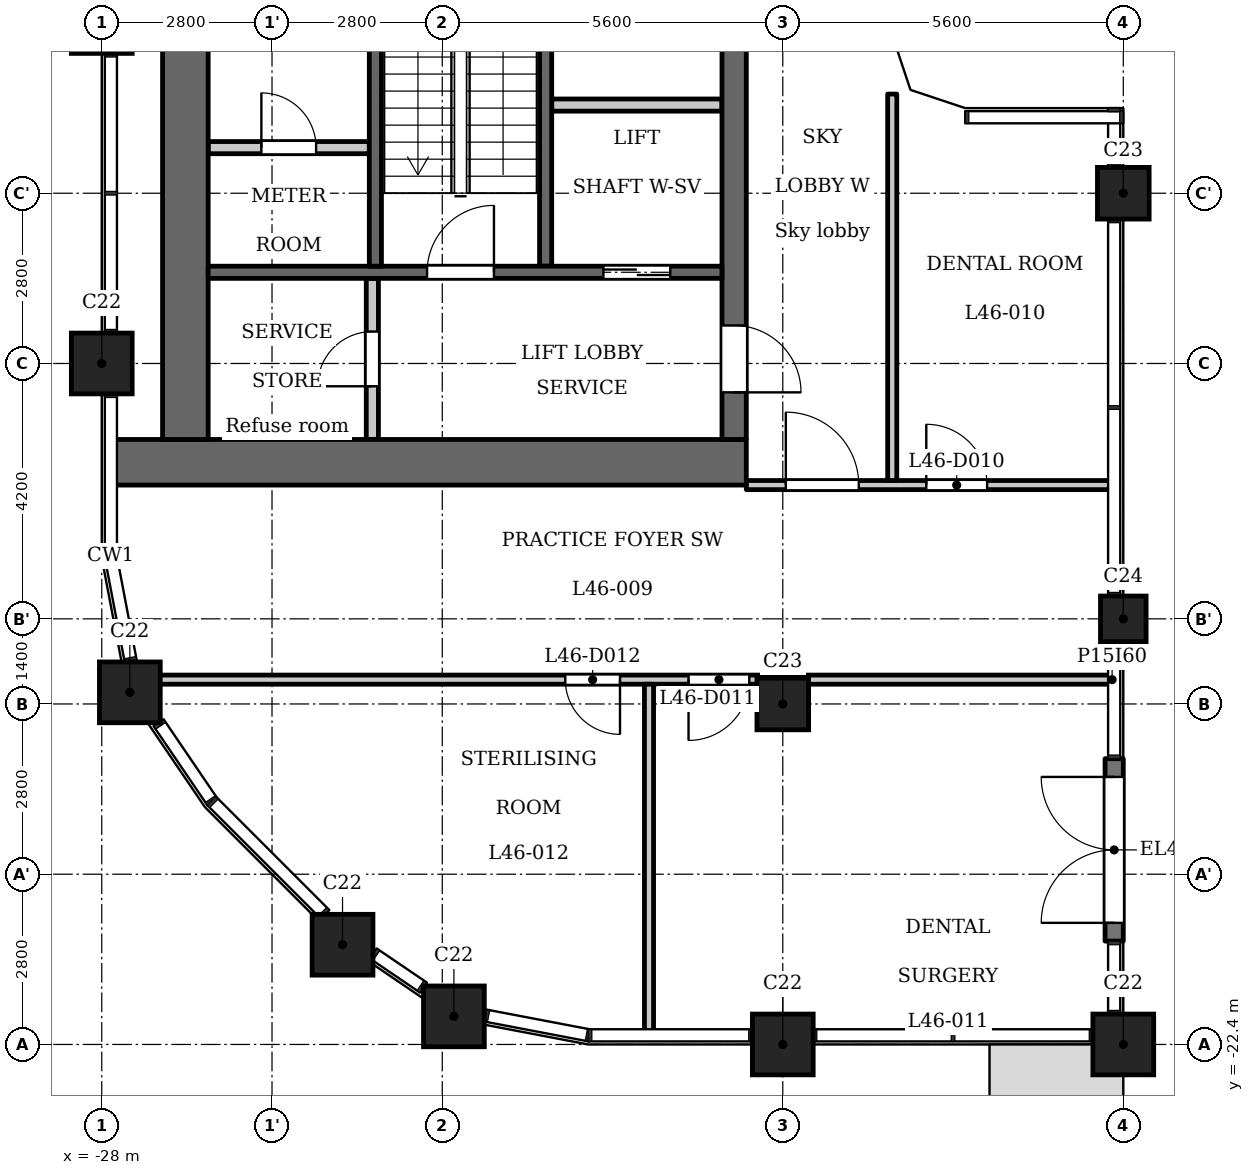
"""IFC4 building model, lengths in metres.
Left out: names, types, materials, properties, quantities, classifications, styles, units other than length and angle.
Written with IfcOpenShell. Run it as: python <this file> out.ifc"""

import sys

from ifc_helpers import new_model, si_unit, direction, frame, frame_2d, origin, origin_2d, place, context, subcontext, project, spatial, polyline, rectangle, outline, extrude, element, fill, save


model = new_model("IFC4")
c1 = context("Model", 3, precision=1e-05, world=origin(), true_north=direction((0.0, 1.0)))
c2 = subcontext(c1, "Body", "Model", "MODEL_VIEW")
j1 = project(units=[si_unit("LENGTHUNIT", "METRE"), si_unit("PLANEANGLEUNIT", "RADIAN")], contexts=[c1])
p1 = place(None, origin())
s1 = spatial("IfcSite", under=j1, at=p1, CompositionType="ELEMENT")
p2 = place(p1, origin())
s2 = spatial("IfcBuilding", under=s1, at=p2, CompositionType="ELEMENT")
p3 = place(p2, frame((0.0, 0.0, 178.1)))
s3 = spatial("IfcBuildingStorey", under=s2, at=p3, CompositionType="ELEMENT", Elevation=178.1)
for number, where, z_axis, x_axis in (
    (1, (-22.209, -21.938, 0.0), (0.0, 0.0, 1.0), (1.0, 0.0, 0.0)),
    (2, (-16.8, -22.4, 0.0), (0.0, 0.0, 1.0), (1.0, 0.0, 0.0)),
    (3, (-11.2, -22.4, 0.0), (0.0, 0.0, 1.0), (1.0, 0.0, 0.0)),
    (4, (-28.0, -5.6, 0.0), (0.0, 0.0, 1.0), (1.0, 0.0, 0.0)),
    (5, (-28.0, -11.2, 0.0), (0.0, 0.0, 1.0), (1.0, 0.0, 0.0)),
    (6, (-27.538, -16.609, 0.0), (0.0, 0.0, 1.0), (1.0, 0.0, 0.0)),
    (7, (-24.04, -20.76, 0.0), (0.0, 0.0, 1.0), (1.0, 0.0, 0.0)),
):
    element("IfcColumn", number, at=place(p3, frame(where, z_axis=z_axis, x_axis=x_axis)), inside=s3, PredefinedType="COLUMN", context=c2, shape_type="SweptSolid", body=[
        extrude(rectangle(XDim=1.0, YDim=1.0, at=origin_2d()), origin(), (0.0, 0.0, 1.0), 5.4),
    ])
for number, where, z_axis, x_axis in (
    (8, (-16.8, -16.8, 0.0), (0.0, 0.0, 1.0), (1.0, 0.0, 0.0)),
    (9, (-11.2, -8.4, 0.0), (0.0, 0.0, 1.0), (1.0, 0.0, 0.0)),
):
    element("IfcColumn", number, at=place(p3, frame(where, z_axis=z_axis, x_axis=x_axis)), inside=s3, PredefinedType="COLUMN", context=c2, shape_type="SweptSolid", body=[
        extrude(rectangle(XDim=0.85, YDim=0.85, at=origin_2d()), origin(), (0.0, 0.0, 1.0), 5.4),
    ])
p4 = place(p3, frame((-11.2, -15.4, 0.0), z_axis=(0.0, 0.0, 1.0), x_axis=(1.0, 0.0, 0.0)))
e10 = element("IfcColumn", 10, at=p4, inside=s3, PredefinedType="COLUMN", context=c2, shape_type="SweptSolid", body=[
    extrude(rectangle(XDim=0.75, YDim=0.75, at=origin_2d()), origin(), (0.0, 0.0, 1.0), 5.4),
])
p5 = place(p3, frame((-11.35, -20.7, 0.0), z_axis=(0.0, 0.0, 1.0), x_axis=(0.0, 1.0, 0.0)))
e11 = element("IfcWall", 11, at=p5, inside=s3, PredefinedType="SOLIDWALL", context=c2, shape_type="SweptSolid", body=[
    extrude(rectangle(XDim=3.0, YDim=0.3, at=frame_2d((1.5, 0.0))), origin(), (0.0, 0.0, 1.0), 4.95),
])
p6 = place(p5, frame((0.3, 0.0, 0.0)))
e12 = element("IfcOpeningElement", 12, at=p6, cuts=e11, PredefinedType="OPENING", context=c2, shape_type="SweptSolid", body=[
    extrude(rectangle(XDim=2.4, YDim=2.3, at=frame_2d((1.2, 1.15))), frame((0.0, 0.16, 0.0), z_axis=(0.0, -1.0, 0.0), x_axis=(1.0, 0.0, 0.0)), (0.0, 0.0, 1.0), 0.32),
])
p7 = place(p3, frame((-20.7, -9.6, 0.0), z_axis=(0.0, 0.0, 1.0), x_axis=(0.0, 1.0, 0.0)))
e13 = element("IfcWall", 13, at=p7, inside=s3, PredefinedType="SHEAR", context=c2, shape_type="SweptSolid", body=[
    extrude(rectangle(XDim=9.75, YDim=0.2, at=frame_2d((4.875, 0.0))), origin(), (0.0, 0.0, 1.0), 4.95),
])
p8 = place(p3, frame((-17.4, -12.825, 0.0), z_axis=(0.0, 0.0, 1.0), x_axis=(-1.0, 0.0, 0.0)))
e14 = element("IfcWall", 14, at=p8, inside=s3, PredefinedType="SHEAR", context=c2, shape_type="SweptSolid", body=[
    extrude(rectangle(XDim=10.4, YDim=0.75, at=frame_2d((5.2, 0.0))), origin(), (0.0, 0.0, 1.0), 4.95),
])
p9 = place(p3, frame((-17.6, -12.45, 0.0), z_axis=(0.0, 0.0, 1.0), x_axis=(0.0, 1.0, 0.0)))
e15 = element("IfcWall", 15, at=p9, inside=s3, PredefinedType="SHEAR", context=c2, shape_type="SweptSolid", body=[
    extrude(rectangle(XDim=24.9, YDim=0.4, at=frame_2d((12.45, 0.0))), origin(), (0.0, 0.0, 1.0), 4.95),
])
p10 = place(p9, frame((6.85, 0.0, 0.0)))
e16 = element("IfcOpeningElement", 16, at=p10, cuts=e15, PredefinedType="OPENING", context=c2, shape_type="SweptSolid", body=[
    extrude(rectangle(XDim=0.9, YDim=2.1, at=frame_2d((0.45, 1.05))), frame((0.0, 0.21, 0.0), z_axis=(0.0, -1.0, 0.0), x_axis=(1.0, 0.0, 0.0)), (0.0, 0.0, 1.0), 0.42),
])
p11 = place(p9, frame((10.45, 0.0, 0.0)))
e17 = element("IfcOpeningElement", 17, at=p11, cuts=e15, PredefinedType="OPENING", context=c2, shape_type="SweptSolid", body=[
    extrude(rectangle(XDim=0.9, YDim=2.1, at=frame_2d((0.45, 1.05))), frame((0.0, 0.21, 0.0), z_axis=(0.0, -1.0, 0.0), x_axis=(1.0, 0.0, 0.0)), (0.0, 0.0, 1.0), 0.42),
])
p12 = place(p9, frame((15.6, 0.0, 0.0)))
e18 = element("IfcOpeningElement", 18, at=p12, cuts=e15, PredefinedType="OPENING", context=c2, shape_type="SweptSolid", body=[
    extrude(rectangle(XDim=1.1, YDim=2.1, at=frame_2d((0.55, 1.05))), frame((0.0, 0.21, 0.0), z_axis=(0.0, -1.0, 0.0), x_axis=(1.0, 0.0, 0.0)), (0.0, 0.0, 1.0), 0.42),
])
p13 = place(p9, frame((18.0, 0.0, 0.0)))
e19 = element("IfcOpeningElement", 19, at=p13, cuts=e15, PredefinedType="OPENING", context=c2, shape_type="SweptSolid", body=[
    extrude(rectangle(XDim=1.1, YDim=2.1, at=frame_2d((0.55, 1.05))), frame((0.0, 0.21, 0.0), z_axis=(0.0, -1.0, 0.0), x_axis=(1.0, 0.0, 0.0)), (0.0, 0.0, 1.0), 0.42),
])
p14 = place(p9, frame((23.025, 0.0, 0.0)))
e20 = element("IfcOpeningElement", 20, at=p14, cuts=e15, PredefinedType="OPENING", context=c2, shape_type="SweptSolid", body=[
    extrude(rectangle(XDim=1.1, YDim=2.1, at=frame_2d((0.55, 1.05))), frame((0.0, 0.21, 0.0), z_axis=(0.0, -1.0, 0.0), x_axis=(1.0, 0.0, 0.0)), (0.0, 0.0, 1.0), 0.42),
])
p15 = place(p9, frame((0.775, 0.0, 0.0)))
e21 = element("IfcOpeningElement", 21, at=p15, cuts=e15, PredefinedType="OPENING", context=c2, shape_type="SweptSolid", body=[
    extrude(rectangle(XDim=1.1, YDim=2.1, at=frame_2d((0.55, 1.05))), frame((0.0, 0.21, 0.0), z_axis=(0.0, -1.0, 0.0), x_axis=(1.0, 0.0, 0.0)), (0.0, 0.0, 1.0), 0.42),
])
p16 = place(p9, frame((12.925, 0.0, 0.0)))
e22 = element("IfcOpeningElement", 22, at=p16, cuts=e15, PredefinedType="OPENING", context=c2, shape_type="SweptSolid", body=[
    extrude(rectangle(XDim=1.8, YDim=2.1, at=frame_2d((0.9, 1.05))), frame((0.0, 0.21, 0.0), z_axis=(0.0, -1.0, 0.0), x_axis=(1.0, 0.0, 0.0)), (0.0, 0.0, 1.0), 0.42),
])
p17 = place(p3, frame((-26.625, -12.45, 0.0), z_axis=(0.0, 0.0, 1.0), x_axis=(0.0, 1.0, 0.0)))
e23 = element("IfcWall", 23, at=p17, inside=s3, PredefinedType="SHEAR", context=c2, shape_type="SweptSolid", body=[
    extrude(rectangle(XDim=24.9, YDim=0.75, at=frame_2d((12.45, 0.0))), origin(), (0.0, 0.0, 1.0), 4.95),
])
p18 = place(p3, frame((-23.55, -12.45, 0.0), z_axis=(0.0, 0.0, 1.0), x_axis=(0.0, 1.0, 0.0)))
e24 = element("IfcWall", 24, at=p18, inside=s3, PredefinedType="PARTITIONING", context=c2, shape_type="SweptSolid", body=[
    extrude(rectangle(XDim=2.65, YDim=0.2, at=frame_2d((1.325, 0.0))), origin(), (0.0, 0.0, 1.0), 4.95),
])
p19 = place(p18, frame((0.875, 0.0, 0.0)))
e25 = element("IfcOpeningElement", 25, at=p19, cuts=e24, PredefinedType="OPENING", context=c2, shape_type="SweptSolid", body=[
    extrude(rectangle(XDim=0.9, YDim=2.1, at=frame_2d((0.45, 1.05))), frame((0.0, 0.11, 0.0), z_axis=(0.0, -1.0, 0.0), x_axis=(1.0, 0.0, 0.0)), (0.0, 0.0, 1.0), 0.22),
])
p20 = place(p3, frame((-23.6, -7.65, 0.0), z_axis=(0.0, 0.0, 1.0), x_axis=(-1.0, 0.0, 0.0)))
e26 = element("IfcWall", 26, at=p20, inside=s3, PredefinedType="PARTITIONING", context=c2, shape_type="SweptSolid", body=[
    extrude(rectangle(XDim=2.65, YDim=0.2, at=frame_2d((1.325, 0.0))), origin(), (0.0, 0.0, 1.0), 4.95),
])
p21 = place(p20, frame((0.875, 0.0, 0.0)))
e27 = element("IfcOpeningElement", 27, at=p21, cuts=e26, PredefinedType="OPENING", context=c2, shape_type="SweptSolid", body=[
    extrude(rectangle(XDim=0.9, YDim=2.1, at=frame_2d((0.45, 1.05))), frame((0.0, 0.11, 0.0), z_axis=(0.0, -1.0, 0.0), x_axis=(1.0, 0.0, 0.0)), (0.0, 0.0, 1.0), 0.22),
])
p22 = place(p3, frame((-17.8, -9.7, 0.0), z_axis=(0.0, 0.0, 1.0), x_axis=(-1.0, 0.0, 0.0)))
e28 = element("IfcWall", 28, at=p22, inside=s3, PredefinedType="SHEAR", context=c2, shape_type="SweptSolid", body=[
    extrude(rectangle(XDim=8.45, YDim=0.2, at=frame_2d((4.225, 0.0))), origin(), (0.0, 0.0, 1.0), 4.95),
])
p23 = place(p22, frame((0.85, 0.0, 0.0)))
e29 = element("IfcOpeningElement", 29, at=p23, cuts=e28, PredefinedType="OPENING", context=c2, shape_type="SweptSolid", body=[
    extrude(rectangle(XDim=1.1, YDim=2.1, at=frame_2d((0.55, 1.05))), frame((0.0, 0.11, 0.0), z_axis=(0.0, -1.0, 0.0), x_axis=(1.0, 0.0, 0.0)), (0.0, 0.0, 1.0), 0.22),
])
p24 = place(p22, frame((3.75, 0.0, 0.0)))
e30 = element("IfcOpeningElement", 30, at=p24, cuts=e28, PredefinedType="OPENING", context=c2, shape_type="SweptSolid", body=[
    extrude(rectangle(XDim=1.1, YDim=2.1, at=frame_2d((0.55, 1.05))), frame((0.0, 0.11, 0.0), z_axis=(0.0, -1.0, 0.0), x_axis=(1.0, 0.0, 0.0)), (0.0, 0.0, 1.0), 0.22),
])
p25 = place(p3, frame((-17.8, -6.95, 0.0), z_axis=(0.0, 0.0, 1.0), x_axis=(-1.0, 0.0, 0.0)))
e31 = element("IfcWall", 31, at=p25, inside=s3, PredefinedType="PARTITIONING", context=c2, shape_type="SweptSolid", body=[
    extrude(rectangle(XDim=2.8, YDim=0.2, at=frame_2d((1.4, 0.0))), origin(), (0.0, 0.0, 1.0), 4.95),
])
p26 = place(p3, frame((-23.5, -9.6, 0.0), z_axis=(0.0, 0.0, 1.0), x_axis=(0.0, 1.0, 0.0)))
e32 = element("IfcWall", 32, at=p26, inside=s3, PredefinedType="SHEAR", context=c2, shape_type="SweptSolid", body=[
    extrude(rectangle(XDim=6.9, YDim=0.2, at=frame_2d((3.45, 0.0))), origin(), (0.0, 0.0, 1.0), 4.95),
])
p27 = place(p3, frame((-27.52, -16.4, 0.0), z_axis=(0.0, 0.0, 1.0), x_axis=(1.0, 0.0, 0.0)))
e33 = element("IfcWall", 33, at=p27, inside=s3, PredefinedType="PARTITIONING", context=c2, shape_type="SweptSolid", body=[
    extrude(rectangle(XDim=16.136, YDim=0.15, at=frame_2d((8.068, 0.0))), origin(), (0.0, 0.0, 1.0), 4.95),
])
p28 = place(p27, frame((9.17, 0.0, 0.0)))
e34 = element("IfcOpeningElement", 34, at=p28, cuts=e33, PredefinedType="OPENING", context=c2, shape_type="SweptSolid", body=[
    extrude(rectangle(XDim=1.0, YDim=2.1, at=frame_2d((0.5, 1.05))), frame((0.0, 0.085, 0.0), z_axis=(0.0, -1.0, 0.0), x_axis=(1.0, 0.0, 0.0)), (0.0, 0.0, 1.0), 0.17),
])
p29 = place(p27, frame((7.143, 0.0, 0.0)))
e35 = element("IfcOpeningElement", 35, at=p29, cuts=e33, PredefinedType="OPENING", context=c2, shape_type="SweptSolid", body=[
    extrude(rectangle(XDim=0.9, YDim=2.1, at=frame_2d((0.45, 1.05))), frame((0.0, 0.085, 0.0), z_axis=(0.0, -1.0, 0.0), x_axis=(1.0, 0.0, 0.0)), (0.0, 0.0, 1.0), 0.17),
])
p30 = place(p3, frame((-17.4, -13.2, 0.0), z_axis=(0.0, 0.0, 1.0), x_axis=(1.0, 0.0, 0.0)))
e36 = element("IfcWall", 36, at=p30, inside=s3, PredefinedType="PARTITIONING", context=c2, shape_type="SweptSolid", body=[
    extrude(rectangle(XDim=6.016, YDim=0.15, at=frame_2d((3.008, 0.0))), origin(), (0.0, 0.0, 1.0), 4.95),
])
p31 = place(p30, frame((0.65, 0.0, 0.0)))
e37 = element("IfcOpeningElement", 37, at=p31, cuts=e36, PredefinedType="OPENING", context=c2, shape_type="SweptSolid", body=[
    extrude(rectangle(XDim=1.2, YDim=2.1, at=frame_2d((0.6, 1.05))), frame((0.0, 0.085, 0.0), z_axis=(0.0, -1.0, 0.0), x_axis=(1.0, 0.0, 0.0)), (0.0, 0.0, 1.0), 0.17),
])
p32 = place(p30, frame((2.96, 0.0, 0.0)))
e38 = element("IfcOpeningElement", 38, at=p32, cuts=e36, PredefinedType="OPENING", context=c2, shape_type="SweptSolid", body=[
    extrude(rectangle(XDim=1.0, YDim=2.1, at=frame_2d((0.5, 1.05))), frame((0.0, 0.085, 0.0), z_axis=(0.0, -1.0, 0.0), x_axis=(1.0, 0.0, 0.0)), (0.0, 0.0, 1.0), 0.17),
])
p33 = place(p3, frame((-19.0, -22.216, 0.0), z_axis=(0.0, 0.0, 1.0), x_axis=(0.0, 1.0, 0.0)))
e39 = element("IfcWall", 39, at=p33, inside=s3, PredefinedType="PARTITIONING", context=c2, shape_type="SweptSolid", body=[
    extrude(rectangle(XDim=5.741, YDim=0.15, at=frame_2d((2.871, 0.0))), origin(), (0.0, 0.0, 1.0), 4.95),
])
p34 = place(p3, frame((-15.0, -13.125, 0.0), z_axis=(0.0, 0.0, 1.0), x_axis=(0.0, 1.0, 0.0)))
e40 = element("IfcWall", 40, at=p34, inside=s3, PredefinedType="PARTITIONING", context=c2, shape_type="SweptSolid", body=[
    extrude(rectangle(XDim=6.356, YDim=0.15, at=frame_2d((3.178, 0.0))), origin(), (0.0, 0.0, 1.0), 4.95),
])
p35 = place(p3, origin())
e41 = element("IfcWall", 41, at=p35, inside=s3, PredefinedType="SOLIDWALL", context=c2, shape_type="SweptSolid", body=[
    extrude(outline(polyline([(-13.8, -7.0), (-14.7, -6.7), (-15.0, -5.8), (-15.3, -5.8), (-15.3, -5.849), (-14.937, -6.937), (-13.849, -7.3), (-13.8, -7.3), (-13.8, -7.0)])), origin(), (0.0, 0.0, 1.0), 4.95),
])
p36 = place(p6, origin())
e42 = element("IfcDoor", 42, at=p36, inside=s3, OperationType="SINGLE_SWING_LEFT", PredefinedType="DOOR", context=c2, shape_type="SweptSolid", body=[
    extrude(rectangle(XDim=2.4, YDim=2.3, at=frame_2d((1.2, 1.15))), frame((0.0, 0.025, 0.0), z_axis=(0.0, -1.0, 0.0), x_axis=(1.0, 0.0, 0.0)), (0.0, 0.0, 1.0), 0.05),
])
fill(e12, e42)
p37 = place(p23, origin())
e43 = element("IfcDoor", 43, at=p37, inside=s3, OperationType="DOUBLE_DOOR_SLIDING", PredefinedType="DOOR", context=c2, shape_type="SweptSolid", body=[
    extrude(rectangle(XDim=1.1, YDim=2.1, at=frame_2d((0.55, 1.05))), frame((0.0, 0.025, 0.0), z_axis=(0.0, -1.0, 0.0), x_axis=(1.0, 0.0, 0.0)), (0.0, 0.0, 1.0), 0.05),
])
fill(e29, e43)
p38 = place(p15, origin())
e44 = element("IfcDoor", 44, at=p38, inside=s3, OperationType="SINGLE_SWING_LEFT", PredefinedType="DOOR", context=c2, shape_type="SweptSolid", body=[
    extrude(rectangle(XDim=1.1, YDim=2.1, at=frame_2d((0.55, 1.05))), frame((0.0, 0.025, 0.0), z_axis=(0.0, -1.0, 0.0), x_axis=(1.0, 0.0, 0.0)), (0.0, 0.0, 1.0), 0.05),
])
fill(e21, e44)
p39 = place(p19, origin())
e45 = element("IfcDoor", 45, at=p39, inside=s3, OperationType="SINGLE_SWING_RIGHT", PredefinedType="DOOR", context=c2, shape_type="SweptSolid", body=[
    extrude(rectangle(XDim=0.9, YDim=2.1, at=frame_2d((0.45, 1.05))), frame((0.0, 0.025, 0.0), z_axis=(0.0, -1.0, 0.0), x_axis=(1.0, 0.0, 0.0)), (0.0, 0.0, 1.0), 0.05),
])
fill(e25, e45)
p40 = place(p24, origin())
e46 = element("IfcDoor", 46, at=p40, inside=s3, OperationType="SINGLE_SWING_LEFT", PredefinedType="DOOR", context=c2, shape_type="SweptSolid", body=[
    extrude(rectangle(XDim=1.1, YDim=2.1, at=frame_2d((0.55, 1.05))), frame((0.0, 0.025, 0.0), z_axis=(0.0, -1.0, 0.0), x_axis=(1.0, 0.0, 0.0)), (0.0, 0.0, 1.0), 0.05),
])
fill(e30, e46)
p41 = place(p21, origin())
e47 = element("IfcDoor", 47, at=p41, inside=s3, OperationType="SINGLE_SWING_RIGHT", PredefinedType="DOOR", context=c2, shape_type="SweptSolid", body=[
    extrude(rectangle(XDim=0.9, YDim=2.1, at=frame_2d((0.45, 1.05))), frame((0.0, 0.025, 0.0), z_axis=(0.0, -1.0, 0.0), x_axis=(1.0, 0.0, 0.0)), (0.0, 0.0, 1.0), 0.05),
])
fill(e27, e47)
p42 = place(p31, origin())
e48 = element("IfcDoor", 48, at=p42, inside=s3, OperationType="SINGLE_SWING_RIGHT", PredefinedType="DOOR", context=c2, shape_type="SweptSolid", body=[
    extrude(rectangle(XDim=1.2, YDim=2.1, at=frame_2d((0.6, 1.05))), frame((0.0, 0.025, 0.0), z_axis=(0.0, -1.0, 0.0), x_axis=(1.0, 0.0, 0.0)), (0.0, 0.0, 1.0), 0.05),
])
fill(e37, e48)
p43 = place(p32, origin())
e49 = element("IfcDoor", 49, at=p43, inside=s3, OperationType="SINGLE_SWING_RIGHT", PredefinedType="DOOR", context=c2, shape_type="SweptSolid", body=[
    extrude(rectangle(XDim=1.0, YDim=2.1, at=frame_2d((0.5, 1.05))), frame((0.0, 0.025, 0.0), z_axis=(0.0, -1.0, 0.0), x_axis=(1.0, 0.0, 0.0)), (0.0, 0.0, 1.0), 0.05),
])
fill(e38, e49)
p44 = place(p28, origin())
e50 = element("IfcDoor", 50, at=p44, inside=s3, OperationType="SINGLE_SWING_LEFT", PredefinedType="DOOR", context=c2, shape_type="SweptSolid", body=[
    extrude(rectangle(XDim=1.0, YDim=2.1, at=frame_2d((0.5, 1.05))), frame((0.0, 0.025, 0.0), z_axis=(0.0, -1.0, 0.0), x_axis=(1.0, 0.0, 0.0)), (0.0, 0.0, 1.0), 0.05),
])
fill(e34, e50)
p45 = place(p29, origin())
e51 = element("IfcDoor", 51, at=p45, inside=s3, OperationType="SINGLE_SWING_RIGHT", PredefinedType="DOOR", context=c2, shape_type="SweptSolid", body=[
    extrude(rectangle(XDim=0.9, YDim=2.1, at=frame_2d((0.45, 1.05))), frame((0.0, 0.025, 0.0), z_axis=(0.0, -1.0, 0.0), x_axis=(1.0, 0.0, 0.0)), (0.0, 0.0, 1.0), 0.05),
])
fill(e35, e51)
save(model, sys.argv[1])
